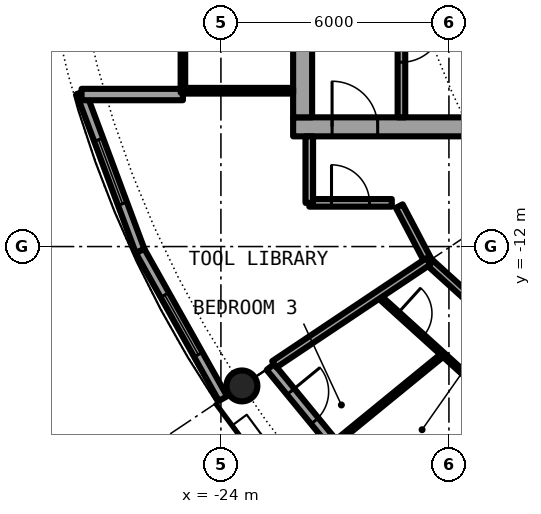
"""IFC4 building model, lengths in metres.
Left out: names, types, materials, properties, quantities, classifications, styles, units other than length and angle.
Written with IfcOpenShell. Run it as: python <this file> out.ifc"""

import sys

from ifc_helpers import new_model, si_unit, direction, frame, frame_2d, origin, origin_2d, place, context, subcontext, project, spatial, rectangle, hollow_circle, extrude, element, fill, save


model = new_model("IFC4")
c1 = context("Model", 3, precision=1e-05, world=origin(), true_north=direction((0.0, 1.0)))
c2 = subcontext(c1, "Body", "Model", "MODEL_VIEW")
j1 = project(units=[si_unit("LENGTHUNIT", "METRE"), si_unit("PLANEANGLEUNIT", "RADIAN")], contexts=[c1])
p1 = place(None, origin())
s1 = spatial("IfcSite", under=j1, at=p1, CompositionType="ELEMENT")
p2 = place(p1, origin())
s2 = spatial("IfcBuilding", under=s1, at=p2, CompositionType="ELEMENT")
p3 = place(p2, frame((0.0, 0.0, 154.35)))
s3 = spatial("IfcBuildingStorey", under=s2, at=p3, CompositionType="ELEMENT", Elevation=154.35)
p4 = place(p3, frame((-23.448, -15.667, 0.0), z_axis=(0.0, 0.0, 1.0), x_axis=(1.0, 0.0, 0.0)))
e1 = element("IfcColumn", 1, at=p4, inside=s3, PredefinedType="COLUMN", context=c2, shape_type="SweptSolid", body=[
    extrude(hollow_circle(Radius=0.406, WallThickness=0.04, at=origin_2d()), origin(), (0.0, 0.0, 1.0), 3.05),
])
p5 = place(p3, frame((-22.699, -15.167, 0.0), z_axis=(0.0, 0.0, 1.0), x_axis=(0.634382322723, -0.773019449054, 0.0)))
e2 = element("IfcWall", 2, at=p5, inside=s3, PredefinedType="SOLIDWALL", context=c2, shape_type="SweptSolid", body=[
    extrude(rectangle(XDim=5.352, YDim=0.25, at=frame_2d((2.676, 0.0))), origin(), (0.0, 0.0, 1.0), 2.7),
])
p6 = place(p5, frame((0.841, 0.0, 0.0)))
e3 = element("IfcOpeningElement", 3, at=p6, cuts=e2, PredefinedType="OPENING", context=c2, shape_type="SweptSolid", body=[
    extrude(rectangle(XDim=1.0, YDim=2.2, at=frame_2d((0.5, 1.1))), frame((0.0, 0.135, 0.0), z_axis=(0.0, -1.0, 0.0), x_axis=(1.0, 0.0, 0.0)), (0.0, 0.0, 1.0), 0.27),
])
p7 = place(p5, frame((3.111, 0.0, 0.3)))
e4 = element("IfcOpeningElement", 4, at=p7, cuts=e2, PredefinedType="OPENING", context=c2, shape_type="SweptSolid", body=[
    extrude(rectangle(XDim=1.8, YDim=2.1, at=frame_2d((0.9, 1.05))), frame((0.0, 0.135, 0.0), z_axis=(0.0, -1.0, 0.0), x_axis=(1.0, 0.0, 0.0)), (0.0, 0.0, 1.0), 0.27),
])
p8 = place(p3, frame((-27.682, -7.945, 0.0), z_axis=(0.0, 0.0, 1.0), x_axis=(0.349247811493, -0.937030397675, 0.0)))
e5 = element("IfcWall", 5, at=p8, inside=s3, PredefinedType="SOLIDWALL", context=c2, shape_type="SweptSolid", body=[
    extrude(rectangle(XDim=4.452, YDim=0.25, at=frame_2d((2.226, 0.0))), origin(), (0.0, 0.0, 1.0), 2.7),
])
p9 = place(p8, frame((1.327, 0.0, 0.3)))
e6 = element("IfcOpeningElement", 6, at=p9, cuts=e5, PredefinedType="OPENING", context=c2, shape_type="SweptSolid", body=[
    extrude(rectangle(XDim=1.8, YDim=2.1, at=frame_2d((0.9, 1.05))), frame((0.0, 0.135, 0.0), z_axis=(0.0, -1.0, 0.0), x_axis=(1.0, 0.0, 0.0)), (0.0, 0.0, 1.0), 0.27),
])
p10 = place(p3, frame((-26.127, -12.117, 0.0), z_axis=(0.0, 0.0, 1.0), x_axis=(0.489696356642, -0.871893042919, 0.0)))
e7 = element("IfcWall", 7, at=p10, inside=s3, PredefinedType="SOLIDWALL", context=c2, shape_type="SweptSolid", body=[
    extrude(rectangle(XDim=4.454, YDim=0.25, at=frame_2d((2.227, 0.0))), origin(), (0.0, 0.0, 1.0), 2.7),
])
p11 = place(p10, frame((1.327, 0.0, 0.3)))
e8 = element("IfcOpeningElement", 8, at=p11, cuts=e7, PredefinedType="OPENING", context=c2, shape_type="SweptSolid", body=[
    extrude(rectangle(XDim=1.8, YDim=2.1, at=frame_2d((0.9, 1.05))), frame((0.0, 0.135, 0.0), z_axis=(0.0, -1.0, 0.0), x_axis=(1.0, 0.0, 0.0)), (0.0, 0.0, 1.0), 0.27),
])
p12 = place(p3, frame((-25.0, -8.0, 0.0), z_axis=(0.0, 0.0, 1.0), x_axis=(-1.0, 0.0, 0.0)))
e9 = element("IfcWall", 9, at=p12, inside=s3, PredefinedType="SOLIDWALL", context=c2, shape_type="SweptSolid", body=[
    extrude(rectangle(XDim=2.667, YDim=0.3, at=frame_2d((1.333, 0.0))), origin(), (0.0, 0.0, 1.0), 2.7),
])
p13 = place(p3, frame((-22.1, -8.85, 0.0), z_axis=(0.0, 0.0, 1.0), x_axis=(1.0, 0.0, 0.0)))
e10 = element("IfcWall", 10, at=p13, inside=s3, PredefinedType="SHEAR", context=c2, shape_type="SweptSolid", body=[
    extrude(rectangle(XDim=13.6, YDim=0.5, at=frame_2d((6.8, 0.0))), origin(), (0.0, 0.0, 1.0), 3.05),
])
p14 = place(p13, frame((1.025, 0.0, 0.0)))
e11 = element("IfcOpeningElement", 11, at=p14, cuts=e10, PredefinedType="OPENING", context=c2, shape_type="SweptSolid", body=[
    extrude(rectangle(XDim=1.2, YDim=2.3, at=frame_2d((0.6, 1.15))), frame((0.0, 0.26, 0.0), z_axis=(0.0, -1.0, 0.0), x_axis=(1.0, 0.0, 0.0)), (0.0, 0.0, 1.0), 0.52),
])
p15 = place(p3, frame((-21.85, -8.6, 0.0), z_axis=(0.0, 0.0, 1.0), x_axis=(0.0, 1.0, 0.0)))
e12 = element("IfcWall", 12, at=p15, inside=s3, PredefinedType="SHEAR", context=c2, shape_type="SweptSolid", body=[
    extrude(rectangle(XDim=17.2, YDim=0.5, at=frame_2d((8.6, 0.0))), origin(), (0.0, 0.0, 1.0), 3.05),
])
p16 = place(p15, frame((7.7, 0.0, 0.0)))
e13 = element("IfcOpeningElement", 13, at=p16, cuts=e12, PredefinedType="OPENING", context=c2, shape_type="SweptSolid", body=[
    extrude(rectangle(XDim=1.8, YDim=2.3, at=frame_2d((0.9, 1.15))), frame((0.0, 0.26, 0.0), z_axis=(0.0, -1.0, 0.0), x_axis=(1.0, 0.0, 0.0)), (0.0, 0.0, 1.0), 0.52),
])
p17 = place(p3, frame((-19.25, -1.575, 0.0), z_axis=(0.0, 0.0, 1.0), x_axis=(0.0, -1.0, 0.0)))
e14 = element("IfcWall", 14, at=p17, inside=s3, PredefinedType="SOLIDWALL", context=c2, shape_type="SweptSolid", body=[
    extrude(rectangle(XDim=7.025, YDim=0.2, at=frame_2d((3.513, 0.0))), origin(), (0.0, 0.0, 1.0), 2.7),
])
p18 = place(p17, frame((4.475, 0.0, 0.0)))
e15 = element("IfcOpeningElement", 15, at=p18, cuts=e14, PredefinedType="OPENING", context=c2, shape_type="SweptSolid", body=[
    extrude(rectangle(XDim=1.1, YDim=2.3, at=frame_2d((0.55, 1.15))), frame((0.0, 0.11, 0.0), z_axis=(0.0, -1.0, 0.0), x_axis=(1.0, 0.0, 0.0)), (0.0, 0.0, 1.0), 0.22),
])
p19 = place(p3, frame((-22.1, -7.9, 0.0), z_axis=(0.0, 0.0, 1.0), x_axis=(-1.0, 0.0, 0.0)))
e16 = element("IfcWall", 16, at=p19, inside=s3, PredefinedType="PARTITIONING", context=c2, shape_type="SweptSolid", body=[
    extrude(rectangle(XDim=2.84, YDim=0.15, at=frame_2d((1.42, 0.0))), origin(), (0.0, 0.0, 1.0), 2.7),
])
p20 = place(p3, frame((-25.0, 7.95, 0.0), z_axis=(0.0, 0.0, 1.0), x_axis=(0.0, -1.0, 0.0)))
e17 = element("IfcWall", 17, at=p20, inside=s3, PredefinedType="PARTITIONING", context=c2, shape_type="SweptSolid", body=[
    extrude(rectangle(XDim=15.9, YDim=0.12, at=frame_2d((7.95, 0.0))), origin(), (0.0, 0.0, 1.0), 2.7),
])
p21 = place(p20, frame((0.95, 0.0, 0.1)))
e18 = element("IfcOpeningElement", 18, at=p21, cuts=e17, PredefinedType="OPENING", context=c2, shape_type="SweptSolid", body=[
    extrude(rectangle(XDim=14.0, YDim=2.35, at=frame_2d((7.0, 1.175))), frame((0.0, 0.07, 0.0), z_axis=(0.0, -1.0, 0.0), x_axis=(1.0, 0.0, 0.0)), (0.0, 0.0, 1.0), 0.14),
])
p22 = place(p3, frame((-19.869, -13.284, 0.0), z_axis=(0.0, 0.0, 1.0), x_axis=(0.741104058203, -0.67139018083, 0.0)))
e19 = element("IfcWall", 19, at=p22, inside=s3, PredefinedType="PARTITIONING", context=c2, shape_type="SweptSolid", body=[
    extrude(rectangle(XDim=6.969, YDim=0.1, at=frame_2d((3.484, 0.0))), origin(), (0.0, 0.0, 1.0), 2.7),
])
p23 = place(p22, frame((3.028, 0.0, 0.0)))
e20 = element("IfcOpeningElement", 20, at=p23, cuts=e19, PredefinedType="OPENING", context=c2, shape_type="SweptSolid", body=[
    extrude(rectangle(XDim=0.9, YDim=2.3, at=frame_2d((0.45, 1.15))), frame((0.0, 0.06, 0.0), z_axis=(0.0, -1.0, 0.0), x_axis=(1.0, 0.0, 0.0)), (0.0, 0.0, 1.0), 0.12),
])
p24 = place(p22, frame((0.705, 0.0, 0.0)))
e21 = element("IfcOpeningElement", 21, at=p24, cuts=e19, PredefinedType="OPENING", context=c2, shape_type="SweptSolid", body=[
    extrude(rectangle(XDim=0.9, YDim=2.3, at=frame_2d((0.45, 1.15))), frame((0.0, 0.06, 0.0), z_axis=(0.0, -1.0, 0.0), x_axis=(1.0, 0.0, 0.0)), (0.0, 0.0, 1.0), 0.12),
])
p25 = place(p3, frame((-19.307, -10.935, 0.0), z_axis=(0.0, 0.0, 1.0), x_axis=(0.465605550524, -0.884992356646, 0.0)))
e22 = element("IfcWall", 22, at=p25, inside=s3, PredefinedType="PARTITIONING", context=c2, shape_type="SweptSolid", body=[
    extrude(rectangle(XDim=1.643, YDim=0.2, at=frame_2d((0.821, 0.0))), origin(), (0.0, 0.0, 1.0), 2.7),
])
p26 = place(p3, frame((-18.542, -12.389, 0.0), z_axis=(0.0, 0.0, 1.0), x_axis=(0.740979597636, -0.671527539188, 0.0)))
e23 = element("IfcWall", 23, at=p26, inside=s3, PredefinedType="PARTITIONING", context=c2, shape_type="SweptSolid", body=[
    extrude(rectangle(XDim=10.841, YDim=0.2, at=frame_2d((5.42, 0.0))), origin(), (0.0, 0.0, 1.0), 2.7),
])
p27 = place(p26, frame((3.835, 0.0, 0.0)))
e24 = element("IfcOpeningElement", 24, at=p27, cuts=e23, PredefinedType="OPENING", context=c2, shape_type="SweptSolid", body=[
    extrude(rectangle(XDim=1.0, YDim=2.3, at=frame_2d((0.5, 1.15))), frame((0.0, 0.11, 0.0), z_axis=(0.0, -1.0, 0.0), x_axis=(1.0, 0.0, 0.0)), (0.0, 0.0, 1.0), 0.22),
])
p28 = place(p3, frame((-21.675, -10.85, 0.0), z_axis=(0.0, 0.0, 1.0), x_axis=(1.0, 0.0, 0.0)))
e25 = element("IfcWall", 25, at=p28, inside=s3, PredefinedType="PARTITIONING", context=c2, shape_type="SweptSolid", body=[
    extrude(rectangle(XDim=2.171, YDim=0.2, at=frame_2d((1.085, 0.0))), origin(), (0.0, 0.0, 1.0), 2.7),
])
p29 = place(p28, frame((0.585, 0.0, 0.0)))
e26 = element("IfcOpeningElement", 26, at=p29, cuts=e25, PredefinedType="OPENING", context=c2, shape_type="SweptSolid", body=[
    extrude(rectangle(XDim=1.0, YDim=2.3, at=frame_2d((0.5, 1.15))), frame((0.0, 0.11, 0.0), z_axis=(0.0, -1.0, 0.0), x_axis=(1.0, 0.0, 0.0)), (0.0, 0.0, 1.0), 0.22),
])
p30 = place(p3, frame((-22.595, -15.098, 0.0), z_axis=(0.0, 0.0, 1.0), x_axis=(0.831387096605, 0.55569370664, 0.0)))
e27 = element("IfcWall", 27, at=p30, inside=s3, PredefinedType="PARTITIONING", context=c2, shape_type="SweptSolid", body=[
    extrude(rectangle(XDim=4.875, YDim=0.2, at=frame_2d((2.438, 0.0))), origin(), (0.0, 0.0, 1.0), 2.7),
])
p31 = place(p3, frame((-21.04, -17.199, 0.0), z_axis=(0.0, 0.0, 1.0), x_axis=(0.774321581607, 0.63279229472, 0.0)))
e28 = element("IfcWall", 28, at=p31, inside=s3, PredefinedType="PARTITIONING", context=c2, shape_type="SweptSolid", body=[
    extrude(rectangle(XDim=3.731, YDim=0.1, at=frame_2d((1.866, 0.0))), origin(), (0.0, 0.0, 1.0), 2.7),
])
p32 = place(p3, frame((-19.231, -19.2, 0.0), z_axis=(0.0, 0.0, 1.0), x_axis=(0.707722727509, 0.706490297858, 0.0)))
e29 = element("IfcWall", 29, at=p32, inside=s3, PredefinedType="PARTITIONING", context=c2, shape_type="SweptSolid", body=[
    extrude(rectangle(XDim=3.962, YDim=0.1, at=frame_2d((1.981, 0.0))), origin(), (0.0, 0.0, 1.0), 2.7),
])
p33 = place(p3, frame((-21.675, -10.85, 0.0), z_axis=(0.0, 0.0, 1.0), x_axis=(0.0, 1.0, 0.0)))
e30 = element("IfcWall", 30, at=p33, inside=s3, PredefinedType="PARTITIONING", context=c2, shape_type="SweptSolid", body=[
    extrude(rectangle(XDim=1.75, YDim=0.2, at=frame_2d((0.875, 0.0))), origin(), (0.0, 0.0, 1.0), 2.7),
])
p34 = place(p6, origin())
e31 = element("IfcDoor", 31, at=p34, inside=s3, OperationType="SINGLE_SWING_LEFT", PredefinedType="DOOR", context=c2, shape_type="SweptSolid", body=[
    extrude(rectangle(XDim=1.0, YDim=2.2, at=frame_2d((0.5, 1.1))), frame((0.0, 0.025, 0.0), z_axis=(0.0, -1.0, 0.0), x_axis=(1.0, 0.0, 0.0)), (0.0, 0.0, 1.0), 0.05),
])
fill(e3, e31)
p35 = place(p9, origin())
e32 = element("IfcWindow", 32, at=p35, inside=s3, PartitioningType="SINGLE_PANEL", PredefinedType="WINDOW", context=c2, shape_type="SweptSolid", body=[
    extrude(rectangle(XDim=1.8, YDim=2.1, at=frame_2d((0.9, 1.05))), frame((0.0, 0.03, 0.0), z_axis=(0.0, -1.0, 0.0), x_axis=(1.0, 0.0, 0.0)), (0.0, 0.0, 1.0), 0.06),
])
fill(e6, e32)
p36 = place(p11, origin())
e33 = element("IfcWindow", 33, at=p36, inside=s3, PartitioningType="SINGLE_PANEL", PredefinedType="WINDOW", context=c2, shape_type="SweptSolid", body=[
    extrude(rectangle(XDim=1.8, YDim=2.1, at=frame_2d((0.9, 1.05))), frame((0.0, 0.03, 0.0), z_axis=(0.0, -1.0, 0.0), x_axis=(1.0, 0.0, 0.0)), (0.0, 0.0, 1.0), 0.06),
])
fill(e8, e33)
p37 = place(p18, origin())
e34 = element("IfcDoor", 34, at=p37, inside=s3, OperationType="SINGLE_SWING_LEFT", PredefinedType="DOOR", context=c2, shape_type="SweptSolid", body=[
    extrude(rectangle(XDim=1.1, YDim=2.3, at=frame_2d((0.55, 1.15))), frame((0.0, 0.025, 0.0), z_axis=(0.0, -1.0, 0.0), x_axis=(1.0, 0.0, 0.0)), (0.0, 0.0, 1.0), 0.05),
])
fill(e15, e34)
p38 = place(p14, origin())
e35 = element("IfcDoor", 35, at=p38, inside=s3, OperationType="SINGLE_SWING_RIGHT", PredefinedType="DOOR", context=c2, shape_type="SweptSolid", body=[
    extrude(rectangle(XDim=1.2, YDim=2.3, at=frame_2d((0.6, 1.15))), frame((0.0, 0.025, 0.0), z_axis=(0.0, -1.0, 0.0), x_axis=(1.0, 0.0, 0.0)), (0.0, 0.0, 1.0), 0.05),
])
fill(e11, e35)
p39 = place(p21, origin())
e36 = element("IfcWindow", 36, at=p39, inside=s3, PartitioningType="SINGLE_PANEL", PredefinedType="WINDOW", context=c2, shape_type="SweptSolid", body=[
    extrude(rectangle(XDim=14.0, YDim=2.35, at=frame_2d((7.0, 1.175))), frame((0.0, 0.03, 0.0), z_axis=(0.0, -1.0, 0.0), x_axis=(1.0, 0.0, 0.0)), (0.0, 0.0, 1.0), 0.06),
])
fill(e18, e36)
p40 = place(p24, origin())
e37 = element("IfcDoor", 37, at=p40, inside=s3, OperationType="SINGLE_SWING_LEFT", PredefinedType="DOOR", context=c2, shape_type="SweptSolid", body=[
    extrude(rectangle(XDim=0.9, YDim=2.3, at=frame_2d((0.45, 1.15))), frame((0.0, 0.025, 0.0), z_axis=(0.0, -1.0, 0.0), x_axis=(1.0, 0.0, 0.0)), (0.0, 0.0, 1.0), 0.05),
])
fill(e21, e37)
p41 = place(p29, origin())
e38 = element("IfcDoor", 38, at=p41, inside=s3, OperationType="SINGLE_SWING_LEFT", PredefinedType="DOOR", context=c2, shape_type="SweptSolid", body=[
    extrude(rectangle(XDim=1.0, YDim=2.3, at=frame_2d((0.5, 1.15))), frame((0.0, 0.025, 0.0), z_axis=(0.0, -1.0, 0.0), x_axis=(1.0, 0.0, 0.0)), (0.0, 0.0, 1.0), 0.05),
])
fill(e26, e38)
save(model, sys.argv[1])
